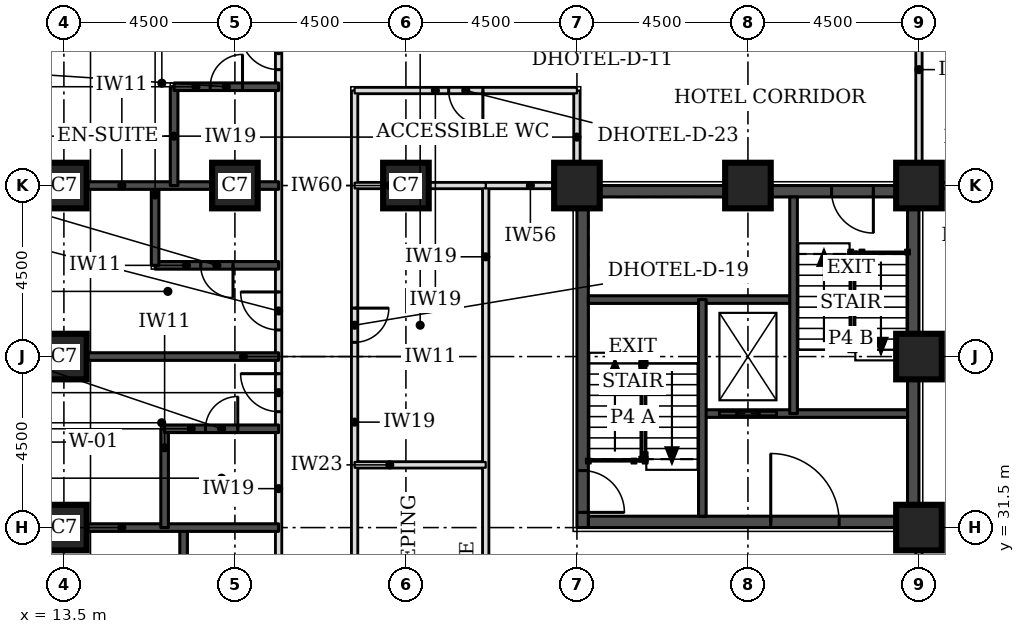
"""IFC4 building model, lengths in metres.
Left out: names, types, materials, properties, quantities, classifications, styles, units other than length and angle.
Written with IfcOpenShell. Run it as: python <this file> out.ifc"""

import sys

from ifc_helpers import new_model, si_unit, direction, frame, frame_2d, origin, origin_2d, place, context, subcontext, project, spatial, rectangle, extrude, element, fill, save


model = new_model("IFC4")
c1 = context("Model", 3, precision=1e-05, world=origin(), true_north=direction((0.0, 1.0)))
c2 = subcontext(c1, "Body", "Model", "MODEL_VIEW")
j1 = project(units=[si_unit("LENGTHUNIT", "METRE"), si_unit("PLANEANGLEUNIT", "RADIAN")], contexts=[c1])
p1 = place(None, origin())
s1 = spatial("IfcSite", under=j1, at=p1, CompositionType="ELEMENT")
p2 = place(p1, origin())
s2 = spatial("IfcBuilding", under=s1, at=p2, CompositionType="ELEMENT")
p3 = place(p2, frame((0.0, 0.0, 59.4)))
s3 = spatial("IfcBuildingStorey", under=s2, at=p3, CompositionType="ELEMENT", Elevation=59.4)
for number, where, z_axis, x_axis in (
    (1, (13.5, 31.5, 0.0), (0.0, 0.0, 1.0), (1.0, 0.0, 0.0)),
    (2, (36.0, 31.5, 0.0), (0.0, 0.0, 1.0), (1.0, 0.0, 0.0)),
    (3, (13.5, 36.0, 0.0), (0.0, 0.0, 1.0), (1.0, 0.0, 0.0)),
    (4, (36.0, 36.0, 0.0), (0.0, 0.0, 1.0), (1.0, 0.0, 0.0)),
    (5, (13.5, 40.5, 0.0), (0.0, 0.0, 1.0), (1.0, 0.0, 0.0)),
    (6, (18.0, 40.5, 0.0), (0.0, 0.0, 1.0), (1.0, 0.0, 0.0)),
    (7, (22.5, 40.5, 0.0), (0.0, 0.0, 1.0), (1.0, 0.0, 0.0)),
    (8, (27.0, 40.5, 0.0), (0.0, 0.0, 1.0), (1.0, 0.0, 0.0)),
    (9, (31.5, 40.5, 0.0), (0.0, 0.0, 1.0), (1.0, 0.0, 0.0)),
    (10, (36.0, 40.5, 0.0), (0.0, 0.0, 1.0), (1.0, 0.0, 0.0)),
):
    element("IfcColumn", number, at=place(p3, frame(where, z_axis=z_axis, x_axis=x_axis)), inside=s3, PredefinedType="COLUMN", context=c2, shape_type="SweptSolid", body=[
        extrude(rectangle(XDim=1.2, YDim=1.2, at=origin_2d()), origin(), (0.0, 0.0, 1.0), 3.3),
    ])
p4 = place(p3, frame((27.3, 31.65, 0.0), z_axis=(0.0, 0.0, 1.0), x_axis=(1.0, 0.0, 0.0)))
e11 = element("IfcWall", 11, at=p4, inside=s3, PredefinedType="SHEAR", context=c2, shape_type="SweptSolid", body=[
    extrude(rectangle(XDim=8.4, YDim=0.3, at=frame_2d((4.2, 0.0))), origin(), (0.0, 0.0, 1.0), 3.3),
])
p5 = place(p4, frame((4.8, 0.0, 0.0)))
e12 = element("IfcOpeningElement", 12, at=p5, cuts=e11, PredefinedType="OPENING", context=c2, shape_type="SweptSolid", body=[
    extrude(rectangle(XDim=1.8, YDim=2.1, at=frame_2d((0.9, 1.05))), frame((0.0, 0.16, 0.0), z_axis=(0.0, -1.0, 0.0), x_axis=(1.0, 0.0, 0.0)), (0.0, 0.0, 1.0), 0.32),
])
p6 = place(p3, frame((27.3, 40.35, 0.0), z_axis=(0.0, 0.0, 1.0), x_axis=(1.0, 0.0, 0.0)))
e13 = element("IfcWall", 13, at=p6, inside=s3, PredefinedType="SHEAR", context=c2, shape_type="SweptSolid", body=[
    extrude(rectangle(XDim=8.4, YDim=0.3, at=frame_2d((4.2, 0.0))), origin(), (0.0, 0.0, 1.0), 3.3),
])
p7 = place(p6, frame((6.4, 0.0, 0.0)))
e14 = element("IfcOpeningElement", 14, at=p7, cuts=e13, PredefinedType="OPENING", context=c2, shape_type="SweptSolid", body=[
    extrude(rectangle(XDim=1.1, YDim=2.1, at=frame_2d((0.55, 1.05))), frame((0.0, 0.16, 0.0), z_axis=(0.0, -1.0, 0.0), x_axis=(1.0, 0.0, 0.0)), (0.0, 0.0, 1.0), 0.32),
])
p8 = place(p3, frame((27.15, 31.5, 0.0), z_axis=(0.0, 0.0, 1.0), x_axis=(0.0, 1.0, 0.0)))
e15 = element("IfcWall", 15, at=p8, inside=s3, PredefinedType="SHEAR", context=c2, shape_type="SweptSolid", body=[
    extrude(rectangle(XDim=9.0, YDim=0.3, at=frame_2d((4.5, 0.0))), origin(), (0.0, 0.0, 1.0), 3.3),
])
p9 = place(p8, frame((0.4, 0.0, 0.0)))
e16 = element("IfcOpeningElement", 16, at=p9, cuts=e15, PredefinedType="OPENING", context=c2, shape_type="SweptSolid", body=[
    extrude(rectangle(XDim=1.1, YDim=2.1, at=frame_2d((0.55, 1.05))), frame((0.0, 0.16, 0.0), z_axis=(0.0, -1.0, 0.0), x_axis=(1.0, 0.0, 0.0)), (0.0, 0.0, 1.0), 0.32),
])
p10 = place(p3, frame((35.85, 31.5, 0.0), z_axis=(0.0, 0.0, 1.0), x_axis=(0.0, 1.0, 0.0)))
e17 = element("IfcWall", 17, at=p10, inside=s3, PredefinedType="SHEAR", context=c2, shape_type="SweptSolid", body=[
    extrude(rectangle(XDim=9.0, YDim=0.3, at=frame_2d((4.5, 0.0))), origin(), (0.0, 0.0, 1.0), 3.3),
])
p11 = place(p3, frame((19.15, 25.15, 0.0), z_axis=(0.0, 0.0, 1.0), x_axis=(0.0, 1.0, 0.0)))
e18 = element("IfcWall", 18, at=p11, inside=s3, PredefinedType="PARTITIONING", context=c2, shape_type="SweptSolid", body=[
    extrude(rectangle(XDim=24.35, YDim=0.15, at=frame_2d((12.175, 0.0))), origin(), (0.0, 0.0, 1.0), 3.08),
])
p12 = place(p11, frame((0.4, 0.0, 0.0)))
e19 = element("IfcOpeningElement", 19, at=p12, cuts=e18, PredefinedType="OPENING", context=c2, shape_type="SweptSolid", body=[
    extrude(rectangle(XDim=1.0, YDim=2.1, at=frame_2d((0.5, 1.05))), frame((0.0, 0.085, 0.0), z_axis=(0.0, -1.0, 0.0), x_axis=(1.0, 0.0, 0.0)), (0.0, 0.0, 1.0), 0.17),
])
p13 = place(p11, frame((2.55, 0.0, 0.0)))
e20 = element("IfcOpeningElement", 20, at=p13, cuts=e18, PredefinedType="OPENING", context=c2, shape_type="SweptSolid", body=[
    extrude(rectangle(XDim=1.0, YDim=2.1, at=frame_2d((0.5, 1.05))), frame((0.0, 0.085, 0.0), z_axis=(0.0, -1.0, 0.0), x_axis=(1.0, 0.0, 0.0)), (0.0, 0.0, 1.0), 0.17),
])
p14 = place(p11, frame((9.4, 0.0, 0.0)))
e21 = element("IfcOpeningElement", 21, at=p14, cuts=e18, PredefinedType="OPENING", context=c2, shape_type="SweptSolid", body=[
    extrude(rectangle(XDim=1.0, YDim=2.1, at=frame_2d((0.5, 1.05))), frame((0.0, 0.085, 0.0), z_axis=(0.0, -1.0, 0.0), x_axis=(1.0, 0.0, 0.0)), (0.0, 0.0, 1.0), 0.17),
])
p15 = place(p11, frame((11.55, 0.0, 0.0)))
e22 = element("IfcOpeningElement", 22, at=p15, cuts=e18, PredefinedType="OPENING", context=c2, shape_type="SweptSolid", body=[
    extrude(rectangle(XDim=1.0, YDim=2.1, at=frame_2d((0.5, 1.05))), frame((0.0, 0.085, 0.0), z_axis=(0.0, -1.0, 0.0), x_axis=(1.0, 0.0, 0.0)), (0.0, 0.0, 1.0), 0.17),
])
p16 = place(p11, frame((18.4, 0.0, 0.0)))
e23 = element("IfcOpeningElement", 23, at=p16, cuts=e18, PredefinedType="OPENING", context=c2, shape_type="SweptSolid", body=[
    extrude(rectangle(XDim=1.0, YDim=2.1, at=frame_2d((0.5, 1.05))), frame((0.0, 0.085, 0.0), z_axis=(0.0, -1.0, 0.0), x_axis=(1.0, 0.0, 0.0)), (0.0, 0.0, 1.0), 0.17),
])
p17 = place(p11, frame((20.55, 0.0, 0.0)))
e24 = element("IfcOpeningElement", 24, at=p17, cuts=e18, PredefinedType="OPENING", context=c2, shape_type="SweptSolid", body=[
    extrude(rectangle(XDim=1.0, YDim=2.1, at=frame_2d((0.5, 1.05))), frame((0.0, 0.085, 0.0), z_axis=(0.0, -1.0, 0.0), x_axis=(1.0, 0.0, 0.0)), (0.0, 0.0, 1.0), 0.17),
])
p18 = place(p3, frame((21.15, 27.15, 0.0), z_axis=(0.0, 0.0, 1.0), x_axis=(0.0, 1.0, 0.0)))
e25 = element("IfcWall", 25, at=p18, inside=s3, PredefinedType="PARTITIONING", context=c2, shape_type="SweptSolid", body=[
    extrude(rectangle(XDim=15.85, YDim=0.15, at=frame_2d((7.925, 0.0))), origin(), (0.0, 0.0, 1.0), 3.08),
])
p19 = place(p18, frame((2.55, 0.0, 0.0)))
e26 = element("IfcOpeningElement", 26, at=p19, cuts=e25, PredefinedType="OPENING", context=c2, shape_type="SweptSolid", body=[
    extrude(rectangle(XDim=0.9, YDim=2.1, at=frame_2d((0.45, 1.05))), frame((0.0, 0.085, 0.0), z_axis=(0.0, -1.0, 0.0), x_axis=(1.0, 0.0, 0.0)), (0.0, 0.0, 1.0), 0.17),
])
p20 = place(p18, frame((9.225, 0.0, 0.0)))
e27 = element("IfcOpeningElement", 27, at=p20, cuts=e25, PredefinedType="OPENING", context=c2, shape_type="SweptSolid", body=[
    extrude(rectangle(XDim=0.9, YDim=2.1, at=frame_2d((0.45, 1.05))), frame((0.0, 0.085, 0.0), z_axis=(0.0, -1.0, 0.0), x_axis=(1.0, 0.0, 0.0)), (0.0, 0.0, 1.0), 0.17),
])
p21 = place(p3, frame((24.6, 27.15, 0.0), z_axis=(0.0, 0.0, 1.0), x_axis=(0.0, 1.0, 0.0)))
e28 = element("IfcWall", 28, at=p21, inside=s3, PredefinedType="PARTITIONING", context=c2, shape_type="SweptSolid", body=[
    extrude(rectangle(XDim=13.35, YDim=0.15, at=frame_2d((6.675, 0.0))), origin(), (0.0, 0.0, 1.0), 3.08),
])
p22 = place(p3, frame((36.0, 29.5, 0.0), z_axis=(0.0, 0.0, 1.0), x_axis=(0.0, 1.0, 0.0)))
e29 = element("IfcWall", 29, at=p22, inside=s3, PredefinedType="PARTITIONING", context=c2, shape_type="SweptSolid", body=[
    extrude(rectangle(XDim=1.95, YDim=0.15, at=frame_2d((0.975, 0.0))), origin(), (0.0, 0.0, 1.0), 2.33),
])
p23 = place(p3, frame((24.6, 40.5, 0.0), z_axis=(0.0, 0.0, 1.0), x_axis=(1.0, 0.0, 0.0)))
e30 = element("IfcWall", 30, at=p23, inside=s3, PredefinedType="PARTITIONING", context=c2, shape_type="SweptSolid", body=[
    extrude(rectangle(XDim=2.35, YDim=0.15, at=frame_2d((1.175, 0.0))), origin(), (0.0, 0.0, 1.0), 2.33),
])
p24 = place(p3, frame((27.0, 40.55, 0.0), z_axis=(0.0, 0.0, 1.0), x_axis=(0.0, 1.0, 0.0)))
e31 = element("IfcWall", 31, at=p24, inside=s3, PredefinedType="PARTITIONING", context=c2, shape_type="SweptSolid", body=[
    extrude(rectangle(XDim=2.45, YDim=0.15, at=frame_2d((1.225, 0.0))), origin(), (0.0, 0.0, 1.0), 3.08),
])
p25 = place(p3, frame((36.0, 40.55, 0.0), z_axis=(0.0, 0.0, 1.0), x_axis=(0.0, 1.0, 0.0)))
e32 = element("IfcWall", 32, at=p25, inside=s3, PredefinedType="PARTITIONING", context=c2, shape_type="SweptSolid", body=[
    extrude(rectangle(XDim=4.4, YDim=0.15, at=frame_2d((2.2, 0.0))), origin(), (0.0, 0.0, 1.0), 2.33),
])
p26 = place(p3, frame((21.15, 43.0, 0.0), z_axis=(0.0, 0.0, 1.0), x_axis=(1.0, 0.0, 0.0)))
e33 = element("IfcWall", 33, at=p26, inside=s3, PredefinedType="PARTITIONING", context=c2, shape_type="SweptSolid", body=[
    extrude(rectangle(XDim=5.85, YDim=0.15, at=frame_2d((2.925, 0.0))), origin(), (0.0, 0.0, 1.0), 3.08),
])
p27 = place(p26, frame((2.475, 0.0, 0.0)))
e34 = element("IfcOpeningElement", 34, at=p27, cuts=e33, PredefinedType="OPENING", context=c2, shape_type="SweptSolid", body=[
    extrude(rectangle(XDim=0.9, YDim=2.1, at=frame_2d((0.45, 1.05))), frame((0.0, 0.085, 0.0), z_axis=(0.0, -1.0, 0.0), x_axis=(1.0, 0.0, 0.0)), (0.0, 0.0, 1.0), 0.17),
])
p28 = place(p3, frame((16.65, 29.4, 0.0), z_axis=(0.0, 0.0, 1.0), x_axis=(0.0, 1.0, 0.0)))
e35 = element("IfcWall", 35, at=p28, inside=s3, PredefinedType="SOLIDWALL", context=c2, shape_type="SweptSolid", body=[
    extrude(rectangle(XDim=2.1, YDim=0.2, at=frame_2d((1.05, 0.0))), origin(), (0.0, 0.0, 1.0), 3.08),
])
p29 = place(p3, frame((14.1, 31.5, 0.0), z_axis=(0.0, 0.0, 1.0), x_axis=(1.0, 0.0, 0.0)))
e36 = element("IfcWall", 36, at=p29, inside=s3, PredefinedType="SOLIDWALL", context=c2, shape_type="SweptSolid", body=[
    extrude(rectangle(XDim=5.05, YDim=0.2, at=frame_2d((2.525, 0.0))), origin(), (0.0, 0.0, 1.0), 3.08),
])
p30 = place(p3, frame((16.15, 31.5, 0.0), z_axis=(0.0, 0.0, 1.0), x_axis=(0.0, 1.0, 0.0)))
e37 = element("IfcWall", 37, at=p30, inside=s3, PredefinedType="SOLIDWALL", context=c2, shape_type="SweptSolid", body=[
    extrude(rectangle(XDim=2.6, YDim=0.2, at=frame_2d((1.3, 0.0))), origin(), (0.0, 0.0, 1.0), 3.08),
])
p31 = place(p3, frame((16.15, 34.1, 0.0), z_axis=(0.0, 0.0, 1.0), x_axis=(1.0, 0.0, 0.0)))
e38 = element("IfcWall", 38, at=p31, inside=s3, PredefinedType="SOLIDWALL", context=c2, shape_type="SweptSolid", body=[
    extrude(rectangle(XDim=3.0, YDim=0.2, at=frame_2d((1.5, 0.0))), origin(), (0.0, 0.0, 1.0), 3.08),
])
p32 = place(p31, frame((1.075, 0.0, 0.0)))
e39 = element("IfcOpeningElement", 39, at=p32, cuts=e38, PredefinedType="OPENING", context=c2, shape_type="SweptSolid", body=[
    extrude(rectangle(XDim=0.85, YDim=2.1, at=frame_2d((0.425, 1.05))), frame((0.0, 0.11, 0.0), z_axis=(0.0, -1.0, 0.0), x_axis=(1.0, 0.0, 0.0)), (0.0, 0.0, 1.0), 0.22),
])
p33 = place(p3, frame((14.1, 36.0, 0.0), z_axis=(0.0, 0.0, 1.0), x_axis=(1.0, 0.0, 0.0)))
e40 = element("IfcWall", 40, at=p33, inside=s3, PredefinedType="SOLIDWALL", context=c2, shape_type="SweptSolid", body=[
    extrude(rectangle(XDim=5.05, YDim=0.2, at=frame_2d((2.525, 0.0))), origin(), (0.0, 0.0, 1.0), 3.08),
])
p34 = place(p3, frame((15.9, 38.4, 0.0), z_axis=(0.0, 0.0, 1.0), x_axis=(1.0, 0.0, 0.0)))
e41 = element("IfcWall", 41, at=p34, inside=s3, PredefinedType="SOLIDWALL", context=c2, shape_type="SweptSolid", body=[
    extrude(rectangle(XDim=3.25, YDim=0.2, at=frame_2d((1.625, 0.0))), origin(), (0.0, 0.0, 1.0), 3.08),
])
p35 = place(p34, frame((1.2, 0.0, 0.0)))
e42 = element("IfcOpeningElement", 42, at=p35, cuts=e41, PredefinedType="OPENING", context=c2, shape_type="SweptSolid", body=[
    extrude(rectangle(XDim=0.85, YDim=2.1, at=frame_2d((0.425, 1.05))), frame((0.0, 0.11, 0.0), z_axis=(0.0, -1.0, 0.0), x_axis=(1.0, 0.0, 0.0)), (0.0, 0.0, 1.0), 0.22),
])
p36 = place(p3, frame((15.9, 38.4, 0.0), z_axis=(0.0, 0.0, 1.0), x_axis=(0.0, 1.0, 0.0)))
e43 = element("IfcWall", 43, at=p36, inside=s3, PredefinedType="SOLIDWALL", context=c2, shape_type="SweptSolid", body=[
    extrude(rectangle(XDim=2.1, YDim=0.2, at=frame_2d((1.05, 0.0))), origin(), (0.0, 0.0, 1.0), 3.08),
])
p37 = place(p3, frame((14.1, 40.5, 0.0), z_axis=(0.0, 0.0, 1.0), x_axis=(1.0, 0.0, 0.0)))
e44 = element("IfcWall", 44, at=p37, inside=s3, PredefinedType="SOLIDWALL", context=c2, shape_type="SweptSolid", body=[
    extrude(rectangle(XDim=5.05, YDim=0.2, at=frame_2d((2.525, 0.0))), origin(), (0.0, 0.0, 1.0), 3.08),
])
p38 = place(p3, frame((16.4, 40.5, 0.0), z_axis=(0.0, 0.0, 1.0), x_axis=(0.0, 1.0, 0.0)))
e45 = element("IfcWall", 45, at=p38, inside=s3, PredefinedType="SOLIDWALL", context=c2, shape_type="SweptSolid", body=[
    extrude(rectangle(XDim=2.6, YDim=0.2, at=frame_2d((1.3, 0.0))), origin(), (0.0, 0.0, 1.0), 3.08),
])
p39 = place(p3, frame((16.4, 43.1, 0.0), z_axis=(0.0, 0.0, 1.0), x_axis=(1.0, 0.0, 0.0)))
e46 = element("IfcWall", 46, at=p39, inside=s3, PredefinedType="SOLIDWALL", context=c2, shape_type="SweptSolid", body=[
    extrude(rectangle(XDim=2.75, YDim=0.2, at=frame_2d((1.375, 0.0))), origin(), (0.0, 0.0, 1.0), 3.08),
])
p40 = place(p39, frame((0.95, 0.0, 0.0)))
e47 = element("IfcOpeningElement", 47, at=p40, cuts=e46, PredefinedType="OPENING", context=c2, shape_type="SweptSolid", body=[
    extrude(rectangle(XDim=0.85, YDim=2.1, at=frame_2d((0.425, 1.05))), frame((0.0, 0.11, 0.0), z_axis=(0.0, -1.0, 0.0), x_axis=(1.0, 0.0, 0.0)), (0.0, 0.0, 1.0), 0.22),
])
p41 = place(p3, frame((21.15, 33.15, 0.0), z_axis=(0.0, 0.0, 1.0), x_axis=(1.0, 0.0, 0.0)))
e48 = element("IfcWall", 48, at=p41, inside=s3, PredefinedType="PARTITIONING", context=c2, shape_type="SweptSolid", body=[
    extrude(rectangle(XDim=3.45, YDim=0.15, at=frame_2d((1.725, 0.0))), origin(), (0.0, 0.0, 1.0), 3.08),
])
p42 = place(p3, frame((21.15, 40.5, 0.0), z_axis=(0.0, 0.0, 1.0), x_axis=(1.0, 0.0, 0.0)))
e49 = element("IfcWall", 49, at=p42, inside=s3, PredefinedType="PARTITIONING", context=c2, shape_type="SweptSolid", body=[
    extrude(rectangle(XDim=3.45, YDim=0.15, at=frame_2d((1.725, 0.0))), origin(), (0.0, 0.0, 1.0), 2.33),
])
p43 = place(p3, frame((36.05, 40.5, 0.0), z_axis=(0.0, 0.0, 1.0), x_axis=(1.0, 0.0, 0.0)))
e50 = element("IfcWall", 50, at=p43, inside=s3, PredefinedType="PARTITIONING", context=c2, shape_type="SweptSolid", body=[
    extrude(rectangle(XDim=2.45, YDim=0.15, at=frame_2d((1.225, 0.0))), origin(), (0.0, 0.0, 1.0), 2.33),
])
p44 = place(p3, frame((30.3, 34.5, 0.0), z_axis=(0.0, 0.0, 1.0), x_axis=(1.0, 0.0, 0.0)))
e51 = element("IfcWall", 51, at=p44, inside=s3, PredefinedType="SOLIDWALL", context=c2, shape_type="SweptSolid", body=[
    extrude(rectangle(XDim=5.4, YDim=0.2, at=frame_2d((2.7, 0.0))), origin(), (0.0, 0.0, 1.0), 3.08),
])
p45 = place(p44, frame((0.45, 0.0, 0.0)))
e52 = element("IfcOpeningElement", 52, at=p45, cuts=e51, PredefinedType="OPENING", context=c2, shape_type="SweptSolid", body=[
    extrude(rectangle(XDim=1.5, YDim=2.1, at=frame_2d((0.75, 1.05))), frame((0.0, 0.11, 0.0), z_axis=(0.0, -1.0, 0.0), x_axis=(1.0, 0.0, 0.0)), (0.0, 0.0, 1.0), 0.22),
])
p46 = place(p3, frame((27.3, 37.5, 0.0), z_axis=(0.0, 0.0, 1.0), x_axis=(1.0, 0.0, 0.0)))
e53 = element("IfcWall", 53, at=p46, inside=s3, PredefinedType="SOLIDWALL", context=c2, shape_type="SweptSolid", body=[
    extrude(rectangle(XDim=5.4, YDim=0.2, at=frame_2d((2.7, 0.0))), origin(), (0.0, 0.0, 1.0), 3.08),
])
for number, where, z_axis, x_axis in (
    (54, (30.3, 31.8, 0.0), (0.0, 0.0, 1.0), (0.0, 1.0, 0.0)),
    (55, (32.7, 34.5, 0.0), (0.0, 0.0, 1.0), (0.0, 1.0, 0.0)),
):
    element("IfcWall", number, at=place(p3, frame(where, z_axis=z_axis, x_axis=x_axis)), inside=s3, PredefinedType="SOLIDWALL", context=c2, shape_type="SweptSolid", body=[
        extrude(rectangle(XDim=5.7, YDim=0.2, at=frame_2d((2.85, 0.0))), origin(), (0.0, 0.0, 1.0), 3.08),
    ])
p47 = place(p14, origin())
e56 = element("IfcDoor", 56, at=p47, inside=s3, OperationType="SINGLE_SWING_RIGHT", PredefinedType="DOOR", context=c2, shape_type="SweptSolid", body=[
    extrude(rectangle(XDim=1.0, YDim=2.1, at=frame_2d((0.5, 1.05))), frame((0.0, 0.025, 0.0), z_axis=(0.0, -1.0, 0.0), x_axis=(1.0, 0.0, 0.0)), (0.0, 0.0, 1.0), 0.05),
])
fill(e21, e56)
p48 = place(p32, origin())
e57 = element("IfcDoor", 57, at=p48, inside=s3, OperationType="SINGLE_SWING_RIGHT", PredefinedType="DOOR", context=c2, shape_type="SweptSolid", body=[
    extrude(rectangle(XDim=0.85, YDim=2.1, at=frame_2d((0.425, 1.05))), frame((0.0, 0.025, 0.0), z_axis=(0.0, -1.0, 0.0), x_axis=(1.0, 0.0, 0.0)), (0.0, 0.0, 1.0), 0.05),
])
fill(e39, e57)
p49 = place(p15, origin())
e58 = element("IfcDoor", 58, at=p49, inside=s3, OperationType="SINGLE_SWING_RIGHT", PredefinedType="DOOR", context=c2, shape_type="SweptSolid", body=[
    extrude(rectangle(XDim=1.0, YDim=2.1, at=frame_2d((0.5, 1.05))), frame((0.0, 0.025, 0.0), z_axis=(0.0, -1.0, 0.0), x_axis=(1.0, 0.0, 0.0)), (0.0, 0.0, 1.0), 0.05),
])
fill(e22, e58)
p50 = place(p35, frame((0.85, 0.0, 0.0), z_axis=(0.0, 0.0, 1.0), x_axis=(-1.0, 0.0, 0.0)))
e59 = element("IfcDoor", 59, at=p50, inside=s3, OperationType="SINGLE_SWING_LEFT", PredefinedType="DOOR", context=c2, shape_type="SweptSolid", body=[
    extrude(rectangle(XDim=0.85, YDim=2.1, at=frame_2d((0.425, 1.05))), frame((0.0, 0.025, 0.0), z_axis=(0.0, -1.0, 0.0), x_axis=(1.0, 0.0, 0.0)), (0.0, 0.0, 1.0), 0.05),
])
fill(e42, e59)
p51 = place(p16, origin())
e60 = element("IfcDoor", 60, at=p51, inside=s3, OperationType="SINGLE_SWING_RIGHT", PredefinedType="DOOR", context=c2, shape_type="SweptSolid", body=[
    extrude(rectangle(XDim=1.0, YDim=2.1, at=frame_2d((0.5, 1.05))), frame((0.0, 0.025, 0.0), z_axis=(0.0, -1.0, 0.0), x_axis=(1.0, 0.0, 0.0)), (0.0, 0.0, 1.0), 0.05),
])
fill(e23, e60)
p52 = place(p40, origin())
e61 = element("IfcDoor", 61, at=p52, inside=s3, OperationType="SINGLE_SWING_RIGHT", PredefinedType="DOOR", context=c2, shape_type="SweptSolid", body=[
    extrude(rectangle(XDim=0.85, YDim=2.1, at=frame_2d((0.425, 1.05))), frame((0.0, 0.025, 0.0), z_axis=(0.0, -1.0, 0.0), x_axis=(1.0, 0.0, 0.0)), (0.0, 0.0, 1.0), 0.05),
])
fill(e47, e61)
p53 = place(p20, frame((0.9, 0.0, 0.0), z_axis=(0.0, 0.0, 1.0), x_axis=(-1.0, 0.0, 0.0)))
e62 = element("IfcDoor", 62, at=p53, inside=s3, OperationType="SINGLE_SWING_LEFT", PredefinedType="DOOR", context=c2, shape_type="SweptSolid", body=[
    extrude(rectangle(XDim=0.9, YDim=2.1, at=frame_2d((0.45, 1.05))), frame((0.0, 0.025, 0.0), z_axis=(0.0, -1.0, 0.0), x_axis=(1.0, 0.0, 0.0)), (0.0, 0.0, 1.0), 0.05),
])
fill(e27, e62)
p54 = place(p27, frame((0.9, 0.0, 0.0), z_axis=(0.0, 0.0, 1.0), x_axis=(-1.0, 0.0, 0.0)))
e63 = element("IfcDoor", 63, at=p54, inside=s3, OperationType="SINGLE_SWING_LEFT", PredefinedType="DOOR", context=c2, shape_type="SweptSolid", body=[
    extrude(rectangle(XDim=0.9, YDim=2.1, at=frame_2d((0.45, 1.05))), frame((0.0, 0.025, 0.0), z_axis=(0.0, -1.0, 0.0), x_axis=(1.0, 0.0, 0.0)), (0.0, 0.0, 1.0), 0.05),
])
fill(e34, e63)
p55 = place(p9, frame((1.1, 0.0, 0.0), z_axis=(0.0, 0.0, 1.0), x_axis=(-1.0, 0.0, 0.0)))
e64 = element("IfcDoor", 64, at=p55, inside=s3, OperationType="SINGLE_SWING_RIGHT", PredefinedType="DOOR", context=c2, shape_type="SweptSolid", body=[
    extrude(rectangle(XDim=1.1, YDim=2.1, at=frame_2d((0.55, 1.05))), frame((0.0, 0.025, 0.0), z_axis=(0.0, -1.0, 0.0), x_axis=(1.0, 0.0, 0.0)), (0.0, 0.0, 1.0), 0.05),
])
fill(e16, e64)
p56 = place(p7, frame((1.1, 0.0, 0.0), z_axis=(0.0, 0.0, 1.0), x_axis=(-1.0, 0.0, 0.0)))
e65 = element("IfcDoor", 65, at=p56, inside=s3, OperationType="SINGLE_SWING_LEFT", PredefinedType="DOOR", context=c2, shape_type="SweptSolid", body=[
    extrude(rectangle(XDim=1.1, YDim=2.1, at=frame_2d((0.55, 1.05))), frame((0.0, 0.025, 0.0), z_axis=(0.0, -1.0, 0.0), x_axis=(1.0, 0.0, 0.0)), (0.0, 0.0, 1.0), 0.05),
])
fill(e14, e65)
p57 = place(p45, origin())
e66 = element("IfcDoor", 66, at=p57, inside=s3, OperationType="DOUBLE_DOOR_SLIDING", PredefinedType="DOOR", context=c2, shape_type="SweptSolid", body=[
    extrude(rectangle(XDim=1.5, YDim=2.1, at=frame_2d((0.75, 1.05))), frame((0.0, 0.025, 0.0), z_axis=(0.0, -1.0, 0.0), x_axis=(1.0, 0.0, 0.0)), (0.0, 0.0, 1.0), 0.05),
])
fill(e52, e66)
p58 = place(p5, origin())
e67 = element("IfcDoor", 67, at=p58, inside=s3, OperationType="SINGLE_SWING_LEFT", PredefinedType="DOOR", context=c2, shape_type="SweptSolid", body=[
    extrude(rectangle(XDim=1.8, YDim=2.1, at=frame_2d((0.9, 1.05))), frame((0.0, 0.025, 0.0), z_axis=(0.0, -1.0, 0.0), x_axis=(1.0, 0.0, 0.0)), (0.0, 0.0, 1.0), 0.05),
])
fill(e12, e67)
save(model, sys.argv[1])
